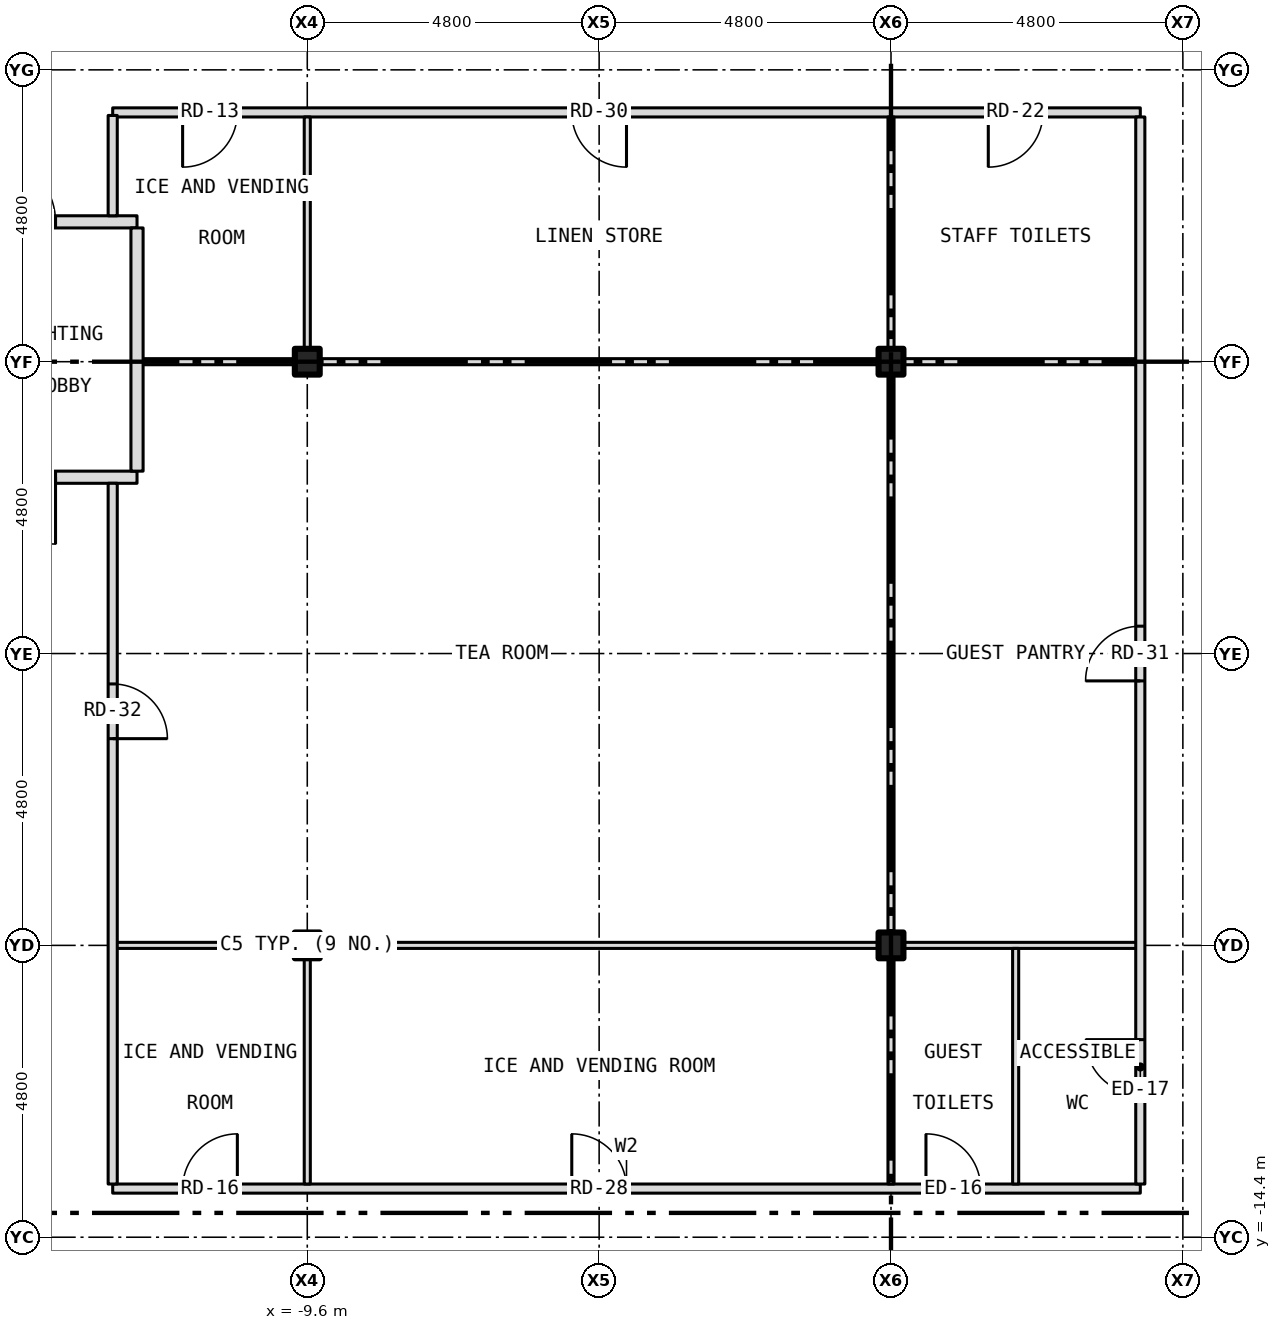
"""IFC4 building model, lengths in metres.
Left out: names, types, materials, properties, quantities, classifications, styles, units other than length and angle.
Written with IfcOpenShell. Run it as: python <this file> out.ifc"""

import sys

from ifc_helpers import new_model, si_unit, direction, frame, frame_2d, origin, origin_2d, place, context, subcontext, project, spatial, rectangle, i_section, extrude, element, fill, save


model = new_model("IFC4")
c1 = context("Model", 3, precision=1e-05, world=origin(), true_north=direction((0.0, 1.0)))
c2 = subcontext(c1, "Body", "Model", "MODEL_VIEW")
j1 = project(units=[si_unit("LENGTHUNIT", "METRE"), si_unit("PLANEANGLEUNIT", "RADIAN")], contexts=[c1])
p1 = place(None, origin())
s1 = spatial("IfcSite", under=j1, at=p1, CompositionType="ELEMENT")
p2 = place(p1, origin())
s2 = spatial("IfcBuilding", under=s1, at=p2, CompositionType="ELEMENT")
p3 = place(p2, frame((0.0, 0.0, 56.5)))
s3 = spatial("IfcBuildingStorey", under=s2, at=p3, CompositionType="ELEMENT", Elevation=56.5)
for number, where, z_axis, x_axis in (
    (1, (-9.6, -9.6, -0.15), (0.0, 0.0, 1.0), (1.0, 0.0, 0.0)),
    (2, (-9.6, 0.0, -0.15), (0.0, 0.0, 1.0), (1.0, 0.0, 0.0)),
    (3, (0.0, -9.6, -0.15), (0.0, 0.0, 1.0), (1.0, 0.0, 0.0)),
    (4, (0.0, 0.0, -0.15), (0.0, 0.0, 1.0), (1.0, 0.0, 0.0)),
):
    element("IfcColumn", number, at=place(p3, frame(where, z_axis=z_axis, x_axis=x_axis)), inside=s3, PredefinedType="COLUMN", context=c2, shape_type="SweptSolid", body=[
        extrude(i_section(OverallWidth=0.409, OverallDepth=0.424, WebThickness=0.033, FlangeThickness=0.052, at=origin_2d()), origin(), (0.0, 0.0, 1.0), 3.5),
    ])
p4 = place(p3, frame((-12.8, -13.6, 0.0), z_axis=(0.0, 0.0, 1.0), x_axis=(1.0, 0.0, 0.0)))
e5 = element("IfcWall", 5, at=p4, inside=s3, PredefinedType="PARTITIONING", context=c2, shape_type="SweptSolid", body=[
    extrude(rectangle(XDim=16.9, YDim=0.15, at=frame_2d((8.45, 0.0))), origin(), (0.0, 0.0, 1.0), 3.35),
])
p5 = place(p4, frame((1.15, 0.0, 0.0)))
e6 = element("IfcOpeningElement", 6, at=p5, cuts=e5, PredefinedType="OPENING", context=c2, shape_type="SweptSolid", body=[
    extrude(rectangle(XDim=0.9, YDim=2.1, at=frame_2d((0.45, 1.05))), frame((0.0, 0.087, 0.0), z_axis=(0.0, -1.0, 0.0), x_axis=(1.0, 0.0, 0.0)), (0.0, 0.0, 1.0), 0.174),
])
p6 = place(p4, frame((13.375, 0.0, 0.0)))
e7 = element("IfcOpeningElement", 7, at=p6, cuts=e5, PredefinedType="OPENING", context=c2, shape_type="SweptSolid", body=[
    extrude(rectangle(XDim=0.9, YDim=2.1, at=frame_2d((0.45, 1.05))), frame((0.0, 0.087, 0.0), z_axis=(0.0, -1.0, 0.0), x_axis=(1.0, 0.0, 0.0)), (0.0, 0.0, 1.0), 0.174),
])
p7 = place(p4, frame((7.55, 0.0, 0.0)))
e8 = element("IfcOpeningElement", 8, at=p7, cuts=e5, PredefinedType="OPENING", context=c2, shape_type="SweptSolid", body=[
    extrude(rectangle(XDim=0.9, YDim=2.1, at=frame_2d((0.45, 1.05))), frame((0.0, 0.087, 0.0), z_axis=(0.0, -1.0, 0.0), x_axis=(1.0, 0.0, 0.0)), (0.0, 0.0, 1.0), 0.174),
])
p8 = place(p3, frame((-12.8, -9.6, 0.0), z_axis=(0.0, 0.0, 1.0), x_axis=(1.0, 0.0, 0.0)))
e9 = element("IfcWall", 9, at=p8, inside=s3, PredefinedType="PARTITIONING", context=c2, shape_type="SweptSolid", body=[
    extrude(rectangle(XDim=2.996, YDim=0.1, at=frame_2d((1.498, 0.0))), origin(), (0.0, 0.0, 1.0), 2.728),
])
p9 = place(p3, frame((-9.804, -9.6, 0.0), z_axis=(0.0, 0.0, 1.0), x_axis=(1.0, 0.0, 0.0)))
e10 = element("IfcWall", 10, at=p9, inside=s3, PredefinedType="PARTITIONING", context=c2, shape_type="SweptSolid", body=[
    extrude(rectangle(XDim=0.408, YDim=0.1, at=frame_2d((0.204, 0.0))), origin(), (0.0, 0.0, 1.0), 3.35),
])
p10 = place(p3, frame((-9.396, -9.6, 0.0), z_axis=(0.0, 0.0, 1.0), x_axis=(1.0, 0.0, 0.0)))
e11 = element("IfcWall", 11, at=p10, inside=s3, PredefinedType="PARTITIONING", context=c2, shape_type="SweptSolid", body=[
    extrude(rectangle(XDim=9.192, YDim=0.1, at=frame_2d((4.596, 0.0))), origin(), (0.0, 0.0, 1.0), 2.728),
])
p11 = place(p3, frame((-0.204, -9.6, 0.0), z_axis=(0.0, 0.0, 1.0), x_axis=(1.0, 0.0, 0.0)))
e12 = element("IfcWall", 12, at=p11, inside=s3, PredefinedType="PARTITIONING", context=c2, shape_type="SweptSolid", body=[
    extrude(rectangle(XDim=0.408, YDim=0.1, at=frame_2d((0.204, 0.0))), origin(), (0.0, 0.0, 1.0), 3.35),
])
p12 = place(p3, frame((0.204, -9.6, 0.0), z_axis=(0.0, 0.0, 1.0), x_axis=(1.0, 0.0, 0.0)))
e13 = element("IfcWall", 13, at=p12, inside=s3, PredefinedType="PARTITIONING", context=c2, shape_type="SweptSolid", body=[
    extrude(rectangle(XDim=3.896, YDim=0.1, at=frame_2d((1.948, 0.0))), origin(), (0.0, 0.0, 1.0), 2.728),
])
p13 = place(p3, frame((-15.68, -1.9, 0.0), z_axis=(0.0, 0.0, 1.0), x_axis=(1.0, 0.0, 0.0)))
e14 = element("IfcWall", 14, at=p13, inside=s3, PredefinedType="PARTITIONING", context=c2, shape_type="SweptSolid", body=[
    extrude(rectangle(XDim=3.28, YDim=0.2, at=frame_2d((1.64, 0.0))), origin(), (0.0, 0.0, 1.0), 3.35),
])
p14 = place(p13, frame((0.84, 0.0, 0.0)))
e15 = element("IfcOpeningElement", 15, at=p14, cuts=e14, PredefinedType="OPENING", context=c2, shape_type="SweptSolid", body=[
    extrude(rectangle(XDim=1.1, YDim=2.1, at=frame_2d((0.55, 1.05))), frame((0.0, 0.112, 0.0), z_axis=(0.0, -1.0, 0.0), x_axis=(1.0, 0.0, 0.0)), (0.0, 0.0, 1.0), 0.224),
])
p15 = place(p3, frame((-12.4, 0.0, 0.0), z_axis=(0.0, 0.0, 1.0), x_axis=(1.0, 0.0, 0.0)))
e16 = element("IfcWall", 16, at=p15, inside=s3, PredefinedType="PARTITIONING", context=c2, shape_type="SweptSolid", body=[
    extrude(rectangle(XDim=2.596, YDim=0.1, at=frame_2d((1.298, 0.0))), origin(), (0.0, 0.0, 1.0), 2.728),
])
p16 = place(p3, frame((-9.804, 0.0, 0.0), z_axis=(0.0, 0.0, 1.0), x_axis=(1.0, 0.0, 0.0)))
e17 = element("IfcWall", 17, at=p16, inside=s3, PredefinedType="PARTITIONING", context=c2, shape_type="SweptSolid", body=[
    extrude(rectangle(XDim=0.408, YDim=0.1, at=frame_2d((0.204, 0.0))), origin(), (0.0, 0.0, 1.0), 3.35),
])
p17 = place(p3, frame((-9.396, 0.0, 0.0), z_axis=(0.0, 0.0, 1.0), x_axis=(1.0, 0.0, 0.0)))
e18 = element("IfcWall", 18, at=p17, inside=s3, PredefinedType="PARTITIONING", context=c2, shape_type="SweptSolid", body=[
    extrude(rectangle(XDim=9.192, YDim=0.1, at=frame_2d((4.596, 0.0))), origin(), (0.0, 0.0, 1.0), 2.728),
])
p18 = place(p3, frame((-0.204, 0.0, 0.0), z_axis=(0.0, 0.0, 1.0), x_axis=(1.0, 0.0, 0.0)))
e19 = element("IfcWall", 19, at=p18, inside=s3, PredefinedType="PARTITIONING", context=c2, shape_type="SweptSolid", body=[
    extrude(rectangle(XDim=0.408, YDim=0.1, at=frame_2d((0.204, 0.0))), origin(), (0.0, 0.0, 1.0), 3.35),
])
p19 = place(p3, frame((0.204, 0.0, 0.0), z_axis=(0.0, 0.0, 1.0), x_axis=(1.0, 0.0, 0.0)))
e20 = element("IfcWall", 20, at=p19, inside=s3, PredefinedType="PARTITIONING", context=c2, shape_type="SweptSolid", body=[
    extrude(rectangle(XDim=3.896, YDim=0.1, at=frame_2d((1.948, 0.0))), origin(), (0.0, 0.0, 1.0), 2.728),
])
p20 = place(p3, frame((-15.68, 2.3, 0.0), z_axis=(0.0, 0.0, 1.0), x_axis=(1.0, 0.0, 0.0)))
e21 = element("IfcWall", 21, at=p20, inside=s3, PredefinedType="PARTITIONING", context=c2, shape_type="SweptSolid", body=[
    extrude(rectangle(XDim=3.28, YDim=0.2, at=frame_2d((1.64, 0.0))), origin(), (0.0, 0.0, 1.0), 3.35),
])
p21 = place(p20, frame((0.84, 0.0, 0.0)))
e22 = element("IfcOpeningElement", 22, at=p21, cuts=e21, PredefinedType="OPENING", context=c2, shape_type="SweptSolid", body=[
    extrude(rectangle(XDim=1.1, YDim=2.1, at=frame_2d((0.55, 1.05))), frame((0.0, 0.112, 0.0), z_axis=(0.0, -1.0, 0.0), x_axis=(1.0, 0.0, 0.0)), (0.0, 0.0, 1.0), 0.224),
])
p22 = place(p3, frame((-12.8, 4.1, 0.0), z_axis=(0.0, 0.0, 1.0), x_axis=(1.0, 0.0, 0.0)))
e23 = element("IfcWall", 23, at=p22, inside=s3, PredefinedType="PARTITIONING", context=c2, shape_type="SweptSolid", body=[
    extrude(rectangle(XDim=16.9, YDim=0.15, at=frame_2d((8.45, 0.0))), origin(), (0.0, 0.0, 1.0), 3.35),
])
p23 = place(p22, frame((1.15, 0.0, 0.0)))
e24 = element("IfcOpeningElement", 24, at=p23, cuts=e23, PredefinedType="OPENING", context=c2, shape_type="SweptSolid", body=[
    extrude(rectangle(XDim=0.9, YDim=2.1, at=frame_2d((0.45, 1.05))), frame((0.0, 0.087, 0.0), z_axis=(0.0, -1.0, 0.0), x_axis=(1.0, 0.0, 0.0)), (0.0, 0.0, 1.0), 0.174),
])
p24 = place(p22, frame((14.4, 0.0, 0.0)))
e25 = element("IfcOpeningElement", 25, at=p24, cuts=e23, PredefinedType="OPENING", context=c2, shape_type="SweptSolid", body=[
    extrude(rectangle(XDim=0.9, YDim=2.1, at=frame_2d((0.45, 1.05))), frame((0.0, 0.087, 0.0), z_axis=(0.0, -1.0, 0.0), x_axis=(1.0, 0.0, 0.0)), (0.0, 0.0, 1.0), 0.174),
])
p25 = place(p22, frame((7.55, 0.0, 0.0)))
e26 = element("IfcOpeningElement", 26, at=p25, cuts=e23, PredefinedType="OPENING", context=c2, shape_type="SweptSolid", body=[
    extrude(rectangle(XDim=0.9, YDim=2.1, at=frame_2d((0.45, 1.05))), frame((0.0, 0.087, 0.0), z_axis=(0.0, -1.0, 0.0), x_axis=(1.0, 0.0, 0.0)), (0.0, 0.0, 1.0), 0.174),
])
p26 = place(p3, frame((-12.8, -13.525, 0.0), z_axis=(0.0, 0.0, 1.0), x_axis=(0.0, 1.0, 0.0)))
e27 = element("IfcWall", 27, at=p26, inside=s3, PredefinedType="PARTITIONING", context=c2, shape_type="SweptSolid", body=[
    extrude(rectangle(XDim=11.525, YDim=0.15, at=frame_2d((5.762, 0.0))), origin(), (0.0, 0.0, 1.0), 3.35),
])
p27 = place(p26, frame((7.325, 0.0, 0.0)))
e28 = element("IfcOpeningElement", 28, at=p27, cuts=e27, PredefinedType="OPENING", context=c2, shape_type="SweptSolid", body=[
    extrude(rectangle(XDim=0.9, YDim=2.1, at=frame_2d((0.45, 1.05))), frame((0.0, 0.087, 0.0), z_axis=(0.0, -1.0, 0.0), x_axis=(1.0, 0.0, 0.0)), (0.0, 0.0, 1.0), 0.174),
])
p28 = place(p3, frame((-12.8, 2.4, 0.0), z_axis=(0.0, 0.0, 1.0), x_axis=(0.0, 1.0, 0.0)))
e29 = element("IfcWall", 29, at=p28, inside=s3, PredefinedType="PARTITIONING", context=c2, shape_type="SweptSolid", body=[
    extrude(rectangle(XDim=1.65, YDim=0.15, at=frame_2d((0.825, 0.0))), origin(), (0.0, 0.0, 1.0), 3.35),
])
p29 = place(p3, frame((-12.4, -1.8, 0.0), z_axis=(0.0, 0.0, 1.0), x_axis=(0.0, 1.0, 0.0)))
e30 = element("IfcWall", 30, at=p29, inside=s3, PredefinedType="PARTITIONING", context=c2, shape_type="SweptSolid", body=[
    extrude(rectangle(XDim=4.0, YDim=0.2, at=frame_2d((2.0, 0.0))), origin(), (0.0, 0.0, 1.0), 3.35),
])
p30 = place(p3, frame((-9.6, -13.525, 0.0), z_axis=(0.0, 0.0, 1.0), x_axis=(0.0, 1.0, 0.0)))
e31 = element("IfcWall", 31, at=p30, inside=s3, PredefinedType="PARTITIONING", context=c2, shape_type="SweptSolid", body=[
    extrude(rectangle(XDim=3.875, YDim=0.1, at=frame_2d((1.938, 0.0))), origin(), (0.0, 0.0, 1.0), 2.728),
])
p31 = place(p3, frame((-9.6, 0.05, 0.0), z_axis=(0.0, 0.0, 1.0), x_axis=(0.0, 1.0, 0.0)))
e32 = element("IfcWall", 32, at=p31, inside=s3, PredefinedType="PARTITIONING", context=c2, shape_type="SweptSolid", body=[
    extrude(rectangle(XDim=3.975, YDim=0.1, at=frame_2d((1.987, 0.0))), origin(), (0.0, 0.0, 1.0), 2.728),
])
p32 = place(p3, frame((0.0, -13.525, 0.0), z_axis=(0.0, 0.0, 1.0), x_axis=(0.0, 1.0, 0.0)))
e33 = element("IfcWall", 33, at=p32, inside=s3, PredefinedType="PARTITIONING", context=c2, shape_type="SweptSolid", body=[
    extrude(rectangle(XDim=3.875, YDim=0.1, at=frame_2d((1.938, 0.0))), origin(), (0.0, 0.0, 1.0), 2.728),
])
p33 = place(p3, frame((0.0, -9.55, 0.0), z_axis=(0.0, 0.0, 1.0), x_axis=(0.0, 1.0, 0.0)))
e34 = element("IfcWall", 34, at=p33, inside=s3, PredefinedType="PARTITIONING", context=c2, shape_type="SweptSolid", body=[
    extrude(rectangle(XDim=9.5, YDim=0.1, at=frame_2d((4.75, 0.0))), origin(), (0.0, 0.0, 1.0), 2.728),
])
p34 = place(p3, frame((0.0, 0.05, 0.0), z_axis=(0.0, 0.0, 1.0), x_axis=(0.0, 1.0, 0.0)))
e35 = element("IfcWall", 35, at=p34, inside=s3, PredefinedType="PARTITIONING", context=c2, shape_type="SweptSolid", body=[
    extrude(rectangle(XDim=3.975, YDim=0.1, at=frame_2d((1.987, 0.0))), origin(), (0.0, 0.0, 1.0), 2.728),
])
p35 = place(p3, frame((2.05, -13.525, 0.0), z_axis=(0.0, 0.0, 1.0), x_axis=(0.0, 1.0, 0.0)))
e36 = element("IfcWall", 36, at=p35, inside=s3, PredefinedType="PARTITIONING", context=c2, shape_type="SweptSolid", body=[
    extrude(rectangle(XDim=3.875, YDim=0.1, at=frame_2d((1.938, 0.0))), origin(), (0.0, 0.0, 1.0), 3.35),
])
p36 = place(p3, frame((4.1, -13.525, 0.0), z_axis=(0.0, 0.0, 1.0), x_axis=(0.0, 1.0, 0.0)))
e37 = element("IfcWall", 37, at=p36, inside=s3, PredefinedType="PARTITIONING", context=c2, shape_type="SweptSolid", body=[
    extrude(rectangle(XDim=17.55, YDim=0.15, at=frame_2d((8.775, 0.0))), origin(), (0.0, 0.0, 1.0), 3.35),
])
p37 = place(p36, frame((1.475, 0.0, 0.0)))
e38 = element("IfcOpeningElement", 38, at=p37, cuts=e37, PredefinedType="OPENING", context=c2, shape_type="SweptSolid", body=[
    extrude(rectangle(XDim=0.9, YDim=2.1, at=frame_2d((0.45, 1.05))), frame((0.0, 0.087, 0.0), z_axis=(0.0, -1.0, 0.0), x_axis=(1.0, 0.0, 0.0)), (0.0, 0.0, 1.0), 0.174),
])
p38 = place(p36, frame((8.275, 0.0, 0.0)))
e39 = element("IfcOpeningElement", 39, at=p38, cuts=e37, PredefinedType="OPENING", context=c2, shape_type="SweptSolid", body=[
    extrude(rectangle(XDim=0.9, YDim=2.1, at=frame_2d((0.45, 1.05))), frame((0.0, 0.087, 0.0), z_axis=(0.0, -1.0, 0.0), x_axis=(1.0, 0.0, 0.0)), (0.0, 0.0, 1.0), 0.174),
])
p39 = place(p21, origin())
e40 = element("IfcDoor", 40, at=p39, inside=s3, OperationType="SINGLE_SWING_LEFT", PredefinedType="DOOR", context=c2, shape_type="SweptSolid", body=[
    extrude(rectangle(XDim=1.1, YDim=2.1, at=frame_2d((0.55, 1.05))), frame((0.0, 0.025, 0.0), z_axis=(0.0, -1.0, 0.0), x_axis=(1.0, 0.0, 0.0)), (0.0, 0.0, 1.0), 0.05),
])
fill(e22, e40)
p40 = place(p14, origin())
e41 = element("IfcDoor", 41, at=p40, inside=s3, OperationType="SINGLE_SWING_RIGHT", PredefinedType="DOOR", context=c2, shape_type="SweptSolid", body=[
    extrude(rectangle(XDim=1.1, YDim=2.1, at=frame_2d((0.55, 1.05))), frame((0.0, 0.025, 0.0), z_axis=(0.0, -1.0, 0.0), x_axis=(1.0, 0.0, 0.0)), (0.0, 0.0, 1.0), 0.05),
])
fill(e15, e41)
p41 = place(p23, origin())
e42 = element("IfcDoor", 42, at=p41, inside=s3, OperationType="SINGLE_SWING_LEFT", PredefinedType="DOOR", context=c2, shape_type="SweptSolid", body=[
    extrude(rectangle(XDim=0.9, YDim=2.1, at=frame_2d((0.45, 1.05))), frame((0.0, 0.025, 0.0), z_axis=(0.0, -1.0, 0.0), x_axis=(1.0, 0.0, 0.0)), (0.0, 0.0, 1.0), 0.05),
])
fill(e24, e42)
p42 = place(p5, origin())
e43 = element("IfcDoor", 43, at=p42, inside=s3, OperationType="SINGLE_SWING_RIGHT", PredefinedType="DOOR", context=c2, shape_type="SweptSolid", body=[
    extrude(rectangle(XDim=0.9, YDim=2.1, at=frame_2d((0.45, 1.05))), frame((0.0, 0.025, 0.0), z_axis=(0.0, -1.0, 0.0), x_axis=(1.0, 0.0, 0.0)), (0.0, 0.0, 1.0), 0.05),
])
fill(e6, e43)
p43 = place(p6, origin())
e44 = element("IfcDoor", 44, at=p43, inside=s3, OperationType="SINGLE_SWING_LEFT", PredefinedType="DOOR", context=c2, shape_type="SweptSolid", body=[
    extrude(rectangle(XDim=0.9, YDim=2.1, at=frame_2d((0.45, 1.05))), frame((0.0, 0.025, 0.0), z_axis=(0.0, -1.0, 0.0), x_axis=(1.0, 0.0, 0.0)), (0.0, 0.0, 1.0), 0.05),
])
fill(e7, e44)
p44 = place(p37, origin())
e45 = element("IfcDoor", 45, at=p44, inside=s3, OperationType="SINGLE_SWING_RIGHT", PredefinedType="DOOR", context=c2, shape_type="SweptSolid", body=[
    extrude(rectangle(XDim=0.9, YDim=2.1, at=frame_2d((0.45, 1.05))), frame((0.0, 0.025, 0.0), z_axis=(0.0, -1.0, 0.0), x_axis=(1.0, 0.0, 0.0)), (0.0, 0.0, 1.0), 0.05),
])
fill(e38, e45)
p45 = place(p24, origin())
e46 = element("IfcDoor", 46, at=p45, inside=s3, OperationType="SINGLE_SWING_LEFT", PredefinedType="DOOR", context=c2, shape_type="SweptSolid", body=[
    extrude(rectangle(XDim=0.9, YDim=2.1, at=frame_2d((0.45, 1.05))), frame((0.0, 0.025, 0.0), z_axis=(0.0, -1.0, 0.0), x_axis=(1.0, 0.0, 0.0)), (0.0, 0.0, 1.0), 0.05),
])
fill(e25, e46)
p46 = place(p7, origin())
e47 = element("IfcDoor", 47, at=p46, inside=s3, OperationType="SINGLE_SWING_LEFT", PredefinedType="DOOR", context=c2, shape_type="SweptSolid", body=[
    extrude(rectangle(XDim=0.9, YDim=2.1, at=frame_2d((0.45, 1.05))), frame((0.0, 0.025, 0.0), z_axis=(0.0, -1.0, 0.0), x_axis=(1.0, 0.0, 0.0)), (0.0, 0.0, 1.0), 0.05),
])
fill(e8, e47)
p47 = place(p25, origin())
e48 = element("IfcDoor", 48, at=p47, inside=s3, OperationType="SINGLE_SWING_RIGHT", PredefinedType="DOOR", context=c2, shape_type="SweptSolid", body=[
    extrude(rectangle(XDim=0.9, YDim=2.1, at=frame_2d((0.45, 1.05))), frame((0.0, 0.025, 0.0), z_axis=(0.0, -1.0, 0.0), x_axis=(1.0, 0.0, 0.0)), (0.0, 0.0, 1.0), 0.05),
])
fill(e26, e48)
p48 = place(p38, origin())
e49 = element("IfcDoor", 49, at=p48, inside=s3, OperationType="SINGLE_SWING_LEFT", PredefinedType="DOOR", context=c2, shape_type="SweptSolid", body=[
    extrude(rectangle(XDim=0.9, YDim=2.1, at=frame_2d((0.45, 1.05))), frame((0.0, 0.025, 0.0), z_axis=(0.0, -1.0, 0.0), x_axis=(1.0, 0.0, 0.0)), (0.0, 0.0, 1.0), 0.05),
])
fill(e39, e49)
p49 = place(p27, origin())
e50 = element("IfcDoor", 50, at=p49, inside=s3, OperationType="SINGLE_SWING_LEFT", PredefinedType="DOOR", context=c2, shape_type="SweptSolid", body=[
    extrude(rectangle(XDim=0.9, YDim=2.1, at=frame_2d((0.45, 1.05))), frame((0.0, 0.025, 0.0), z_axis=(0.0, -1.0, 0.0), x_axis=(1.0, 0.0, 0.0)), (0.0, 0.0, 1.0), 0.05),
])
fill(e28, e50)
save(model, sys.argv[1])
